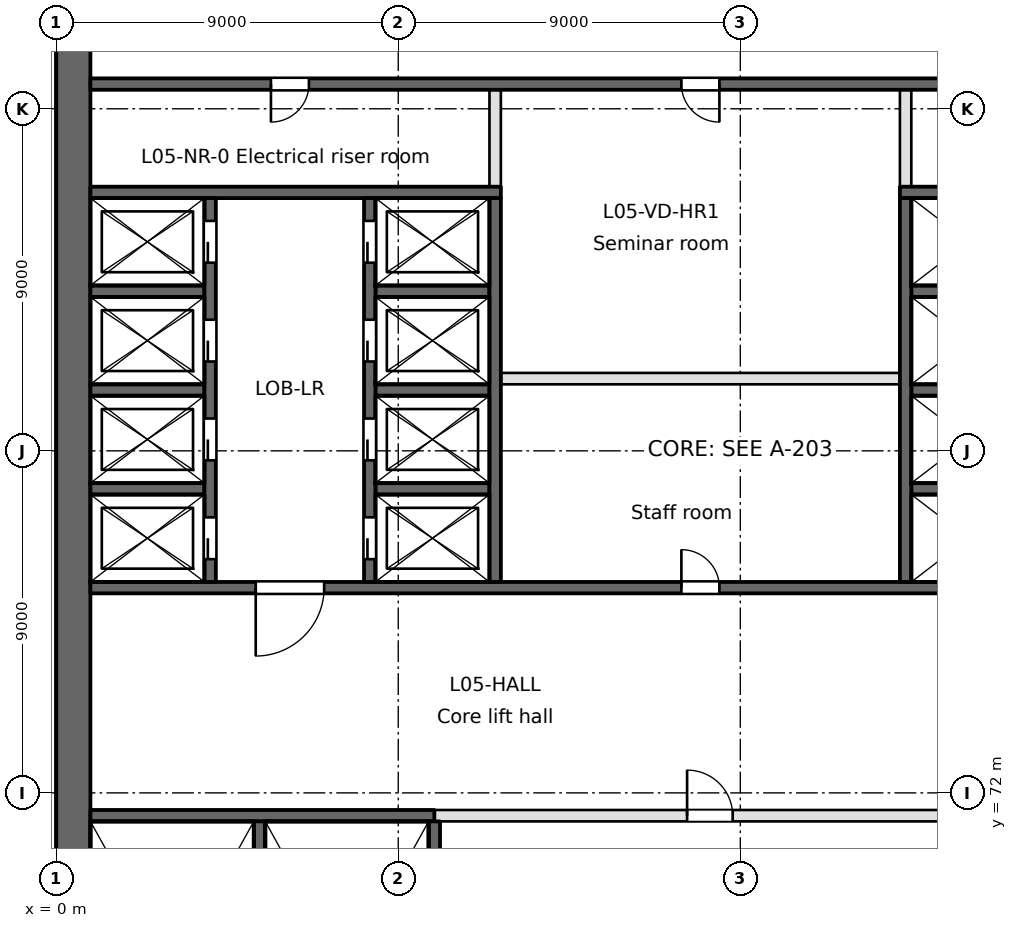
"""IFC4 building model, lengths in metres.
Left out: names, types, materials, properties, quantities, classifications, styles, units other than length and angle.
Written with IfcOpenShell. Run it as: python <this file> out.ifc"""

import sys

from ifc_helpers import new_model, si_unit, direction, frame, frame_2d, origin, place, context, subcontext, project, spatial, rectangle, extrude, element, fill, save


model = new_model("IFC4")
c1 = context("Model", 3, precision=1e-05, world=origin(), true_north=direction((0.0, 1.0)))
c2 = subcontext(c1, "Body", "Model", "MODEL_VIEW")
j1 = project(units=[si_unit("LENGTHUNIT", "METRE"), si_unit("PLANEANGLEUNIT", "RADIAN")], contexts=[c1])
p1 = place(None, origin())
s1 = spatial("IfcSite", under=j1, at=p1, CompositionType="ELEMENT")
p2 = place(p1, origin())
s2 = spatial("IfcBuilding", under=s1, at=p2, CompositionType="ELEMENT")
p3 = place(p2, frame((0.0, 0.0, 26.4)))
s3 = spatial("IfcBuildingStorey", under=s2, at=p3, CompositionType="ELEMENT", Elevation=26.4)
p4 = place(p3, frame((0.45, 94.5, 0.0), z_axis=(0.0, 0.0, 1.0), x_axis=(0.0, -1.0, 0.0)))
e1 = element("IfcWall", 1, at=p4, inside=s3, PredefinedType="SHEAR", context=c2, shape_type="SweptSolid", body=[
    extrude(rectangle(XDim=66.085, YDim=0.9, at=frame_2d((33.042, 0.0))), origin(), (0.0, 0.0, 1.0), 4.8),
])
p5 = place(p3, frame((0.9, 71.4, -0.35), z_axis=(0.0, 0.0, 1.0), x_axis=(1.0, 0.0, 0.0)))
e2 = element("IfcWall", 2, at=p5, inside=s3, PredefinedType="SOLIDWALL", context=c2, shape_type="SweptSolid", body=[
    extrude(rectangle(XDim=9.05, YDim=0.3, at=frame_2d((4.525, 0.0))), origin(), (0.0, 0.0, 1.0), 4.7),
])
p6 = place(p3, frame((9.95, 71.4, 0.0), z_axis=(0.0, 0.0, 1.0), x_axis=(1.0, 0.0, 0.0)))
e3 = element("IfcWall", 3, at=p6, inside=s3, PredefinedType="PARTITIONING", context=c2, shape_type="SweptSolid", body=[
    extrude(rectangle(XDim=17.65, YDim=0.3, at=frame_2d((8.825, 0.0))), origin(), (0.0, 0.0, 1.0), 4.35),
])
p7 = place(p6, frame((15.1, 0.0, 0.0)))
e4 = element("IfcOpeningElement", 4, at=p7, cuts=e3, PredefinedType="OPENING", context=c2, shape_type="SweptSolid", body=[
    extrude(rectangle(XDim=1.8, YDim=2.1, at=frame_2d((0.9, 1.05))), frame((0.0, 0.15, 0.0), z_axis=(0.0, -1.0, 0.0), x_axis=(1.0, 0.0, 0.0)), (0.0, 0.0, 1.0), 0.3),
])
p8 = place(p6, frame((6.65, 0.0, 0.0)))
e5 = element("IfcOpeningElement", 5, at=p8, cuts=e3, PredefinedType="OPENING", context=c2, shape_type="SweptSolid", body=[
    extrude(rectangle(XDim=1.2, YDim=2.1, at=frame_2d((0.6, 1.05))), frame((0.0, 0.15, 0.0), z_axis=(0.0, -1.0, 0.0), x_axis=(1.0, 0.0, 0.0)), (0.0, 0.0, 1.0), 0.3),
])
p9 = place(p3, frame((0.9, 77.4, -0.35), z_axis=(0.0, 0.0, 1.0), x_axis=(1.0, 0.0, 0.0)))
e6 = element("IfcWall", 6, at=p9, inside=s3, PredefinedType="SOLIDWALL", context=c2, shape_type="SweptSolid", body=[
    extrude(rectangle(XDim=28.95, YDim=0.3, at=frame_2d((14.475, 0.0))), origin(), (0.0, 0.0, 1.0), 4.7),
])
p10 = place(p9, frame((4.35, 0.0, 0.35)))
e7 = element("IfcOpeningElement", 7, at=p10, cuts=e6, PredefinedType="OPENING", context=c2, shape_type="SweptSolid", body=[
    extrude(rectangle(XDim=1.8, YDim=2.1, at=frame_2d((0.9, 1.05))), frame((0.0, 0.15, 0.0), z_axis=(0.0, -1.0, 0.0), x_axis=(1.0, 0.0, 0.0)), (0.0, 0.0, 1.0), 0.3),
])
p11 = place(p9, frame((25.95, 0.0, 0.35)))
e8 = element("IfcOpeningElement", 8, at=p11, cuts=e6, PredefinedType="OPENING", context=c2, shape_type="SweptSolid", body=[
    extrude(rectangle(XDim=1.8, YDim=2.1, at=frame_2d((0.9, 1.05))), frame((0.0, 0.15, 0.0), z_axis=(0.0, -1.0, 0.0), x_axis=(1.0, 0.0, 0.0)), (0.0, 0.0, 1.0), 0.3),
])
p12 = place(p9, frame((15.55, 0.0, 0.35)))
e9 = element("IfcOpeningElement", 9, at=p12, cuts=e6, PredefinedType="OPENING", context=c2, shape_type="SweptSolid", body=[
    extrude(rectangle(XDim=1.0, YDim=2.1, at=frame_2d((0.5, 1.05))), frame((0.0, 0.15, 0.0), z_axis=(0.0, -1.0, 0.0), x_axis=(1.0, 0.0, 0.0)), (0.0, 0.0, 1.0), 0.3),
])
for number, where, z_axis, x_axis in (
    (10, (0.9, 80.0, -0.35), (0.0, 0.0, 1.0), (1.0, 0.0, 0.0)),
    (11, (8.4, 80.0, -0.35), (0.0, 0.0, 1.0), (1.0, 0.0, 0.0)),
    (12, (22.5, 80.0, -0.35), (0.0, 0.0, 1.0), (1.0, 0.0, 0.0)),
    (13, (0.9, 82.6, -0.35), (0.0, 0.0, 1.0), (1.0, 0.0, 0.0)),
    (14, (8.4, 82.6, -0.35), (0.0, 0.0, 1.0), (1.0, 0.0, 0.0)),
    (15, (22.5, 82.6, -0.35), (0.0, 0.0, 1.0), (1.0, 0.0, 0.0)),
):
    element("IfcWall", number, at=place(p3, frame(where, z_axis=z_axis, x_axis=x_axis)), inside=s3, PredefinedType="SOLIDWALL", context=c2, shape_type="SweptSolid", body=[
        extrude(rectangle(XDim=3.0, YDim=0.3, at=frame_2d((1.5, 0.0))), origin(), (0.0, 0.0, 1.0), 4.7),
    ])
p13 = place(p3, frame((11.7, 82.9, 0.0), z_axis=(0.0, 0.0, 1.0), x_axis=(1.0, 0.0, 0.0)))
e16 = element("IfcWall", 16, at=p13, inside=s3, PredefinedType="PARTITIONING", context=c2, shape_type="SweptSolid", body=[
    extrude(rectangle(XDim=10.5, YDim=0.3, at=frame_2d((5.25, 0.0))), origin(), (0.0, 0.0, 1.0), 4.35),
])
for number, where, z_axis, x_axis in (
    (17, (0.9, 85.2, -0.35), (0.0, 0.0, 1.0), (1.0, 0.0, 0.0)),
    (18, (8.4, 85.2, -0.35), (0.0, 0.0, 1.0), (1.0, 0.0, 0.0)),
    (19, (22.5, 85.2, -0.35), (0.0, 0.0, 1.0), (1.0, 0.0, 0.0)),
):
    element("IfcWall", number, at=place(p3, frame(where, z_axis=z_axis, x_axis=x_axis)), inside=s3, PredefinedType="SOLIDWALL", context=c2, shape_type="SweptSolid", body=[
        extrude(rectangle(XDim=3.0, YDim=0.3, at=frame_2d((1.5, 0.0))), origin(), (0.0, 0.0, 1.0), 4.7),
    ])
p14 = place(p3, frame((0.9, 87.8, -0.35), z_axis=(0.0, 0.0, 1.0), x_axis=(1.0, 0.0, 0.0)))
e20 = element("IfcWall", 20, at=p14, inside=s3, PredefinedType="SOLIDWALL", context=c2, shape_type="SweptSolid", body=[
    extrude(rectangle(XDim=10.8, YDim=0.3, at=frame_2d((5.4, 0.0))), origin(), (0.0, 0.0, 1.0), 4.7),
])
p15 = place(p3, frame((22.2, 87.8, -0.35), z_axis=(0.0, 0.0, 1.0), x_axis=(1.0, 0.0, 0.0)))
e21 = element("IfcWall", 21, at=p15, inside=s3, PredefinedType="SOLIDWALL", context=c2, shape_type="SweptSolid", body=[
    extrude(rectangle(XDim=7.8, YDim=0.3, at=frame_2d((3.9, 0.0))), origin(), (0.0, 0.0, 1.0), 4.7),
])
p16 = place(p3, frame((0.9, 90.65, -0.35), z_axis=(0.0, 0.0, 1.0), x_axis=(1.0, 0.0, 0.0)))
e22 = element("IfcWall", 22, at=p16, inside=s3, PredefinedType="SOLIDWALL", context=c2, shape_type="SweptSolid", body=[
    extrude(rectangle(XDim=34.6, YDim=0.3, at=frame_2d((17.3, 0.0))), origin(), (0.0, 0.0, 1.0), 4.7),
])
p17 = place(p16, frame((4.75, 0.0, 0.35)))
e23 = element("IfcOpeningElement", 23, at=p17, cuts=e22, PredefinedType="OPENING", context=c2, shape_type="SweptSolid", body=[
    extrude(rectangle(XDim=1.0, YDim=2.1, at=frame_2d((0.5, 1.05))), frame((0.0, 0.15, 0.0), z_axis=(0.0, -1.0, 0.0), x_axis=(1.0, 0.0, 0.0)), (0.0, 0.0, 1.0), 0.3),
])
p18 = place(p16, frame((24.7, 0.0, 0.35)))
e24 = element("IfcOpeningElement", 24, at=p18, cuts=e22, PredefinedType="OPENING", context=c2, shape_type="SweptSolid", body=[
    extrude(rectangle(XDim=1.0, YDim=2.1, at=frame_2d((0.5, 1.05))), frame((0.0, 0.15, 0.0), z_axis=(0.0, -1.0, 0.0), x_axis=(1.0, 0.0, 0.0)), (0.0, 0.0, 1.0), 0.3),
])
p19 = place(p16, frame((15.55, 0.0, 0.35)))
e25 = element("IfcOpeningElement", 25, at=p19, cuts=e22, PredefinedType="OPENING", context=c2, shape_type="SweptSolid", body=[
    extrude(rectangle(XDim=1.0, YDim=2.1, at=frame_2d((0.5, 1.05))), frame((0.0, 0.15, 0.0), z_axis=(0.0, -1.0, 0.0), x_axis=(1.0, 0.0, 0.0)), (0.0, 0.0, 1.0), 0.3),
])
p20 = place(p16, frame((31.4, 0.0, 0.35)))
e26 = element("IfcOpeningElement", 26, at=p20, cuts=e22, PredefinedType="OPENING", context=c2, shape_type="SweptSolid", body=[
    extrude(rectangle(XDim=1.0, YDim=2.1, at=frame_2d((0.5, 1.05))), frame((0.0, 0.15, 0.0), z_axis=(0.0, -1.0, 0.0), x_axis=(1.0, 0.0, 0.0)), (0.0, 0.0, 1.0), 0.3),
])
p21 = place(p3, frame((4.05, 77.55, -0.35), z_axis=(0.0, 0.0, 1.0), x_axis=(0.0, 1.0, 0.0)))
e27 = element("IfcWall", 27, at=p21, inside=s3, PredefinedType="SOLIDWALL", context=c2, shape_type="SweptSolid", body=[
    extrude(rectangle(XDim=10.1, YDim=0.3, at=frame_2d((5.05, 0.0))), origin(), (0.0, 0.0, 1.0), 4.7),
])
p22 = place(p21, frame((0.6, 0.0, 0.35)))
e28 = element("IfcOpeningElement", 28, at=p22, cuts=e27, PredefinedType="OPENING", context=c2, shape_type="SweptSolid", body=[
    extrude(rectangle(XDim=1.1, YDim=2.1, at=frame_2d((0.55, 1.05))), frame((0.0, 0.15, 0.0), z_axis=(0.0, -1.0, 0.0), x_axis=(1.0, 0.0, 0.0)), (0.0, 0.0, 1.0), 0.3),
])
p23 = place(p21, frame((3.2, 0.0, 0.35)))
e29 = element("IfcOpeningElement", 29, at=p23, cuts=e27, PredefinedType="OPENING", context=c2, shape_type="SweptSolid", body=[
    extrude(rectangle(XDim=1.1, YDim=2.1, at=frame_2d((0.55, 1.05))), frame((0.0, 0.15, 0.0), z_axis=(0.0, -1.0, 0.0), x_axis=(1.0, 0.0, 0.0)), (0.0, 0.0, 1.0), 0.3),
])
p24 = place(p21, frame((5.8, 0.0, 0.35)))
e30 = element("IfcOpeningElement", 30, at=p24, cuts=e27, PredefinedType="OPENING", context=c2, shape_type="SweptSolid", body=[
    extrude(rectangle(XDim=1.1, YDim=2.1, at=frame_2d((0.55, 1.05))), frame((0.0, 0.15, 0.0), z_axis=(0.0, -1.0, 0.0), x_axis=(1.0, 0.0, 0.0)), (0.0, 0.0, 1.0), 0.3),
])
p25 = place(p21, frame((8.4, 0.0, 0.35)))
e31 = element("IfcOpeningElement", 31, at=p25, cuts=e27, PredefinedType="OPENING", context=c2, shape_type="SweptSolid", body=[
    extrude(rectangle(XDim=1.1, YDim=2.1, at=frame_2d((0.55, 1.05))), frame((0.0, 0.15, 0.0), z_axis=(0.0, -1.0, 0.0), x_axis=(1.0, 0.0, 0.0)), (0.0, 0.0, 1.0), 0.3),
])
p26 = place(p3, frame((5.35, 63.5, -0.35), z_axis=(0.0, 0.0, 1.0), x_axis=(0.0, 1.0, 0.0)))
e32 = element("IfcWall", 32, at=p26, inside=s3, PredefinedType="SOLIDWALL", context=c2, shape_type="SweptSolid", body=[
    extrude(rectangle(XDim=7.75, YDim=0.3, at=frame_2d((3.875, 0.0))), origin(), (0.0, 0.0, 1.0), 4.7),
])
p27 = place(p3, frame((8.25, 77.55, -0.35), z_axis=(0.0, 0.0, 1.0), x_axis=(0.0, 1.0, 0.0)))
e33 = element("IfcWall", 33, at=p27, inside=s3, PredefinedType="SOLIDWALL", context=c2, shape_type="SweptSolid", body=[
    extrude(rectangle(XDim=10.1, YDim=0.3, at=frame_2d((5.05, 0.0))), origin(), (0.0, 0.0, 1.0), 4.7),
])
p28 = place(p27, frame((0.6, 0.0, 0.35)))
e34 = element("IfcOpeningElement", 34, at=p28, cuts=e33, PredefinedType="OPENING", context=c2, shape_type="SweptSolid", body=[
    extrude(rectangle(XDim=1.1, YDim=2.1, at=frame_2d((0.55, 1.05))), frame((0.0, 0.15, 0.0), z_axis=(0.0, -1.0, 0.0), x_axis=(1.0, 0.0, 0.0)), (0.0, 0.0, 1.0), 0.3),
])
p29 = place(p27, frame((3.2, 0.0, 0.35)))
e35 = element("IfcOpeningElement", 35, at=p29, cuts=e33, PredefinedType="OPENING", context=c2, shape_type="SweptSolid", body=[
    extrude(rectangle(XDim=1.1, YDim=2.1, at=frame_2d((0.55, 1.05))), frame((0.0, 0.15, 0.0), z_axis=(0.0, -1.0, 0.0), x_axis=(1.0, 0.0, 0.0)), (0.0, 0.0, 1.0), 0.3),
])
p30 = place(p27, frame((5.8, 0.0, 0.35)))
e36 = element("IfcOpeningElement", 36, at=p30, cuts=e33, PredefinedType="OPENING", context=c2, shape_type="SweptSolid", body=[
    extrude(rectangle(XDim=1.1, YDim=2.1, at=frame_2d((0.55, 1.05))), frame((0.0, 0.15, 0.0), z_axis=(0.0, -1.0, 0.0), x_axis=(1.0, 0.0, 0.0)), (0.0, 0.0, 1.0), 0.3),
])
p31 = place(p27, frame((8.4, 0.0, 0.35)))
e37 = element("IfcOpeningElement", 37, at=p31, cuts=e33, PredefinedType="OPENING", context=c2, shape_type="SweptSolid", body=[
    extrude(rectangle(XDim=1.1, YDim=2.1, at=frame_2d((0.55, 1.05))), frame((0.0, 0.15, 0.0), z_axis=(0.0, -1.0, 0.0), x_axis=(1.0, 0.0, 0.0)), (0.0, 0.0, 1.0), 0.3),
])
p32 = place(p3, frame((9.95, 63.5, -0.35), z_axis=(0.0, 0.0, 1.0), x_axis=(0.0, 1.0, 0.0)))
e38 = element("IfcWall", 38, at=p32, inside=s3, PredefinedType="SOLIDWALL", context=c2, shape_type="SweptSolid", body=[
    extrude(rectangle(XDim=7.75, YDim=0.3, at=frame_2d((3.875, 0.0))), origin(), (0.0, 0.0, 1.0), 4.7),
])
p33 = place(p3, frame((11.55, 77.55, -0.35), z_axis=(0.0, 0.0, 1.0), x_axis=(0.0, 1.0, 0.0)))
e39 = element("IfcWall", 39, at=p33, inside=s3, PredefinedType="SOLIDWALL", context=c2, shape_type="SweptSolid", body=[
    extrude(rectangle(XDim=10.1, YDim=0.3, at=frame_2d((5.05, 0.0))), origin(), (0.0, 0.0, 1.0), 4.7),
])
p34 = place(p3, frame((11.55, 87.95, 0.0), z_axis=(0.0, 0.0, 1.0), x_axis=(0.0, 1.0, 0.0)))
e40 = element("IfcWall", 40, at=p34, inside=s3, PredefinedType="PARTITIONING", context=c2, shape_type="SweptSolid", body=[
    extrude(rectangle(XDim=2.55, YDim=0.3, at=frame_2d((1.275, 0.0))), origin(), (0.0, 0.0, 1.0), 4.35),
])
p35 = place(p3, frame((22.35, 77.55, -0.35), z_axis=(0.0, 0.0, 1.0), x_axis=(0.0, 1.0, 0.0)))
e41 = element("IfcWall", 41, at=p35, inside=s3, PredefinedType="SOLIDWALL", context=c2, shape_type="SweptSolid", body=[
    extrude(rectangle(XDim=10.1, YDim=0.3, at=frame_2d((5.05, 0.0))), origin(), (0.0, 0.0, 1.0), 4.7),
])
p36 = place(p3, frame((22.35, 87.95, 0.0), z_axis=(0.0, 0.0, 1.0), x_axis=(0.0, 1.0, 0.0)))
e42 = element("IfcWall", 42, at=p36, inside=s3, PredefinedType="PARTITIONING", context=c2, shape_type="SweptSolid", body=[
    extrude(rectangle(XDim=2.55, YDim=0.3, at=frame_2d((1.275, 0.0))), origin(), (0.0, 0.0, 1.0), 4.35),
])
p37 = place(p22, origin())
e43 = element("IfcDoor", 43, at=p37, inside=s3, OperationType="SLIDING_TO_RIGHT", PredefinedType="DOOR", context=c2, shape_type="SweptSolid", body=[
    extrude(rectangle(XDim=1.1, YDim=2.1, at=frame_2d((0.55, 1.05))), frame((0.0, 0.025, 0.0), z_axis=(0.0, -1.0, 0.0), x_axis=(1.0, 0.0, 0.0)), (0.0, 0.0, 1.0), 0.05),
])
fill(e28, e43)
p38 = place(p23, origin())
e44 = element("IfcDoor", 44, at=p38, inside=s3, OperationType="SLIDING_TO_LEFT", PredefinedType="DOOR", context=c2, shape_type="SweptSolid", body=[
    extrude(rectangle(XDim=1.1, YDim=2.1, at=frame_2d((0.55, 1.05))), frame((0.0, 0.025, 0.0), z_axis=(0.0, -1.0, 0.0), x_axis=(1.0, 0.0, 0.0)), (0.0, 0.0, 1.0), 0.05),
])
fill(e29, e44)
p39 = place(p24, origin())
e45 = element("IfcDoor", 45, at=p39, inside=s3, OperationType="SLIDING_TO_RIGHT", PredefinedType="DOOR", context=c2, shape_type="SweptSolid", body=[
    extrude(rectangle(XDim=1.1, YDim=2.1, at=frame_2d((0.55, 1.05))), frame((0.0, 0.025, 0.0), z_axis=(0.0, -1.0, 0.0), x_axis=(1.0, 0.0, 0.0)), (0.0, 0.0, 1.0), 0.05),
])
fill(e30, e45)
p40 = place(p25, origin())
e46 = element("IfcDoor", 46, at=p40, inside=s3, OperationType="SLIDING_TO_LEFT", PredefinedType="DOOR", context=c2, shape_type="SweptSolid", body=[
    extrude(rectangle(XDim=1.1, YDim=2.1, at=frame_2d((0.55, 1.05))), frame((0.0, 0.025, 0.0), z_axis=(0.0, -1.0, 0.0), x_axis=(1.0, 0.0, 0.0)), (0.0, 0.0, 1.0), 0.05),
])
fill(e31, e46)
p41 = place(p28, origin())
e47 = element("IfcDoor", 47, at=p41, inside=s3, OperationType="SLIDING_TO_RIGHT", PredefinedType="DOOR", context=c2, shape_type="SweptSolid", body=[
    extrude(rectangle(XDim=1.1, YDim=2.1, at=frame_2d((0.55, 1.05))), frame((0.0, 0.025, 0.0), z_axis=(0.0, -1.0, 0.0), x_axis=(1.0, 0.0, 0.0)), (0.0, 0.0, 1.0), 0.05),
])
fill(e34, e47)
p42 = place(p29, origin())
e48 = element("IfcDoor", 48, at=p42, inside=s3, OperationType="SLIDING_TO_LEFT", PredefinedType="DOOR", context=c2, shape_type="SweptSolid", body=[
    extrude(rectangle(XDim=1.1, YDim=2.1, at=frame_2d((0.55, 1.05))), frame((0.0, 0.025, 0.0), z_axis=(0.0, -1.0, 0.0), x_axis=(1.0, 0.0, 0.0)), (0.0, 0.0, 1.0), 0.05),
])
fill(e35, e48)
p43 = place(p30, origin())
e49 = element("IfcDoor", 49, at=p43, inside=s3, OperationType="SLIDING_TO_RIGHT", PredefinedType="DOOR", context=c2, shape_type="SweptSolid", body=[
    extrude(rectangle(XDim=1.1, YDim=2.1, at=frame_2d((0.55, 1.05))), frame((0.0, 0.025, 0.0), z_axis=(0.0, -1.0, 0.0), x_axis=(1.0, 0.0, 0.0)), (0.0, 0.0, 1.0), 0.05),
])
fill(e36, e49)
p44 = place(p31, origin())
e50 = element("IfcDoor", 50, at=p44, inside=s3, OperationType="SLIDING_TO_LEFT", PredefinedType="DOOR", context=c2, shape_type="SweptSolid", body=[
    extrude(rectangle(XDim=1.1, YDim=2.1, at=frame_2d((0.55, 1.05))), frame((0.0, 0.025, 0.0), z_axis=(0.0, -1.0, 0.0), x_axis=(1.0, 0.0, 0.0)), (0.0, 0.0, 1.0), 0.05),
])
fill(e37, e50)
p45 = place(p10, frame((1.8, 0.0, 0.0), z_axis=(0.0, 0.0, 1.0), x_axis=(-1.0, 0.0, 0.0)))
e51 = element("IfcDoor", 51, at=p45, inside=s3, OperationType="SINGLE_SWING_RIGHT", PredefinedType="DOOR", context=c2, shape_type="SweptSolid", body=[
    extrude(rectangle(XDim=1.8, YDim=2.1, at=frame_2d((0.9, 1.05))), frame((0.0, 0.025, 0.0), z_axis=(0.0, -1.0, 0.0), x_axis=(1.0, 0.0, 0.0)), (0.0, 0.0, 1.0), 0.05),
])
fill(e7, e51)
p46 = place(p8, origin())
e52 = element("IfcDoor", 52, at=p46, inside=s3, OperationType="SINGLE_SWING_LEFT", PredefinedType="DOOR", context=c2, shape_type="SweptSolid", body=[
    extrude(rectangle(XDim=1.2, YDim=2.1, at=frame_2d((0.6, 1.05))), frame((0.0, 0.025, 0.0), z_axis=(0.0, -1.0, 0.0), x_axis=(1.0, 0.0, 0.0)), (0.0, 0.0, 1.0), 0.05),
])
fill(e5, e52)
p47 = place(p17, frame((1.0, 0.0, 0.0), z_axis=(0.0, 0.0, 1.0), x_axis=(-1.0, 0.0, 0.0)))
e53 = element("IfcDoor", 53, at=p47, inside=s3, OperationType="SINGLE_SWING_RIGHT", PredefinedType="DOOR", context=c2, shape_type="SweptSolid", body=[
    extrude(rectangle(XDim=1.0, YDim=2.1, at=frame_2d((0.5, 1.05))), frame((0.0, 0.025, 0.0), z_axis=(0.0, -1.0, 0.0), x_axis=(1.0, 0.0, 0.0)), (0.0, 0.0, 1.0), 0.05),
])
fill(e23, e53)
p48 = place(p12, origin())
e54 = element("IfcDoor", 54, at=p48, inside=s3, OperationType="SINGLE_SWING_LEFT", PredefinedType="DOOR", context=c2, shape_type="SweptSolid", body=[
    extrude(rectangle(XDim=1.0, YDim=2.1, at=frame_2d((0.5, 1.05))), frame((0.0, 0.025, 0.0), z_axis=(0.0, -1.0, 0.0), x_axis=(1.0, 0.0, 0.0)), (0.0, 0.0, 1.0), 0.05),
])
fill(e9, e54)
p49 = place(p19, frame((1.0, 0.0, 0.0), z_axis=(0.0, 0.0, 1.0), x_axis=(-1.0, 0.0, 0.0)))
e55 = element("IfcDoor", 55, at=p49, inside=s3, OperationType="SINGLE_SWING_LEFT", PredefinedType="DOOR", context=c2, shape_type="SweptSolid", body=[
    extrude(rectangle(XDim=1.0, YDim=2.1, at=frame_2d((0.5, 1.05))), frame((0.0, 0.025, 0.0), z_axis=(0.0, -1.0, 0.0), x_axis=(1.0, 0.0, 0.0)), (0.0, 0.0, 1.0), 0.05),
])
fill(e25, e55)
save(model, sys.argv[1])
